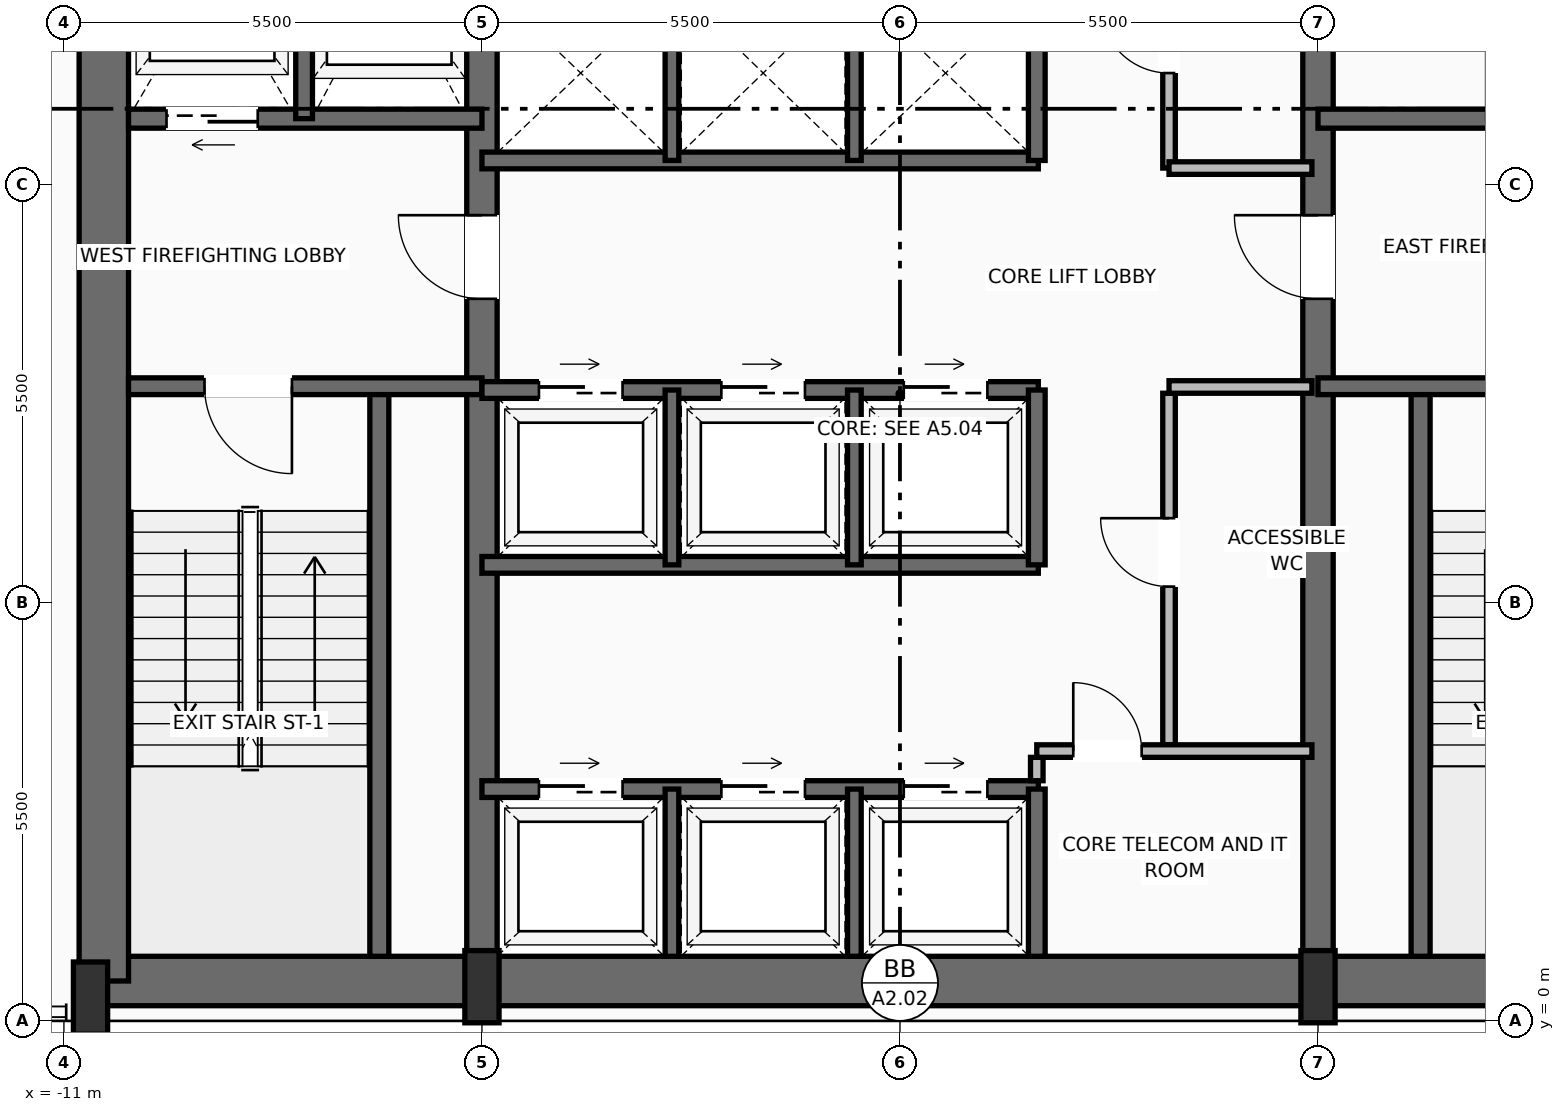
"""IFC4 building model, lengths in metres.
Left out: names, types, materials, properties, quantities, classifications, styles, units other than length and angle.
Written with IfcOpenShell. Run it as: python <this file> out.ifc"""

import sys

from ifc_helpers import new_model, si_unit, direction, frame, frame_2d, origin, origin_2d, place, context, subcontext, project, spatial, rectangle, extrude, source, transform, mapped, element, fill, save


model = new_model("IFC4")
c1 = context("Model", 3, precision=1e-05, world=origin(), true_north=direction((0.0, 1.0)))
c2 = subcontext(c1, "Body", "Model", "MODEL_VIEW")
j1 = project(units=[si_unit("LENGTHUNIT", "METRE"), si_unit("PLANEANGLEUNIT", "RADIAN")], contexts=[c1])
p1 = place(None, origin())
s1 = spatial("IfcSite", under=j1, at=p1, CompositionType="ELEMENT")
p2 = place(p1, origin())
s2 = spatial("IfcBuilding", under=s1, at=p2, CompositionType="ELEMENT")
p3 = place(p2, frame((0.0, 0.0, 121.0)))
s3 = spatial("IfcBuildingStorey", under=s2, at=p3, CompositionType="ELEMENT", Elevation=121.0)
p4 = place(p3, frame((-10.65, 0.525, 0.0), z_axis=(0.0, 0.0, 1.0), x_axis=(1.0, 0.0, 0.0)))
e1 = element("IfcWall", 1, at=p4, inside=s3, PredefinedType="SHEAR", context=c2, shape_type="SweptSolid", body=[
    extrude(rectangle(XDim=21.3, YDim=0.65, at=frame_2d((10.65, 0.0))), origin(), (0.0, 0.0, 1.0), 4.37),
])
p5 = place(p3, frame((-10.475, 0.525, 0.0), z_axis=(0.0, 0.0, 1.0), x_axis=(0.0, 1.0, 0.0)))
e2 = element("IfcWall", 2, at=p5, inside=s3, PredefinedType="SHEAR", context=c2, shape_type="SweptSolid", body=[
    extrude(rectangle(XDim=15.55, YDim=0.65, at=frame_2d((7.775, 0.0))), origin(), (0.0, 0.0, 1.0), 4.37),
])
p6 = place(p3, frame((-5.5, 0.525, 0.0), z_axis=(0.0, 0.0, 1.0), x_axis=(0.0, 1.0, 0.0)))
e3 = element("IfcWall", 3, at=p6, inside=s3, PredefinedType="SHEAR", context=c2, shape_type="SweptSolid", body=[
    extrude(rectangle(XDim=15.55, YDim=0.4, at=frame_2d((7.775, 0.0))), origin(), (0.0, 0.0, 1.0), 4.37),
])
p7 = place(p6, frame((8.975, 0.0, 0.0)))
e4 = element("IfcOpeningElement", 4, at=p7, cuts=e3, PredefinedType="OPENING", context=c2, shape_type="SweptSolid", body=[
    extrude(rectangle(XDim=1.1, YDim=2.2, at=frame_2d((0.55, 1.1))), frame((0.0, 0.21, 0.0), z_axis=(0.0, -1.0, 0.0), x_axis=(1.0, 0.0, 0.0)), (0.0, 0.0, 1.0), 0.42),
])
p8 = place(p3, frame((5.5, 0.525, 0.0), z_axis=(0.0, 0.0, 1.0), x_axis=(0.0, 1.0, 0.0)))
e5 = element("IfcWall", 5, at=p8, inside=s3, PredefinedType="SHEAR", context=c2, shape_type="SweptSolid", body=[
    extrude(rectangle(XDim=15.55, YDim=0.4, at=frame_2d((7.775, 0.0))), origin(), (0.0, 0.0, 1.0), 4.37),
])
p9 = place(p8, frame((8.975, 0.0, 0.0)))
e6 = element("IfcOpeningElement", 6, at=p9, cuts=e5, PredefinedType="OPENING", context=c2, shape_type="SweptSolid", body=[
    extrude(rectangle(XDim=1.1, YDim=2.2, at=frame_2d((0.55, 1.1))), frame((0.0, 0.21, 0.0), z_axis=(0.0, -1.0, 0.0), x_axis=(1.0, 0.0, 0.0)), (0.0, 0.0, 1.0), 0.42),
])
m1 = source(origin(), c2, "Body", "SweptSolid", [
    extrude(rectangle(XDim=0.45, YDim=0.95, at=origin_2d()), origin(), (0.0, 0.0, 1.0), 4.6),
])
for number, where, z_axis, x_axis in (
    (7, (-10.65, 0.3, 0.0), (0.0, 0.0, 1.0), (1.0, 0.0, 0.0)),
    (8, (-5.5, 0.45, 0.0), (0.0, 0.0, 1.0), (1.0, 0.0, 0.0)),
    (9, (5.5, 0.45, 0.0), (0.0, 0.0, 1.0), (1.0, 0.0, 0.0)),
):
    element("IfcColumn", number, at=place(p3, frame(where, z_axis=z_axis, x_axis=x_axis)), inside=s3, PredefinedType="PILASTER", context=c2, shape_type="MappedRepresentation", body=[
        mapped(m1, transform((0.0, 0.0, 0.0), scale=1.0)),
    ])
p10 = place(p3, frame((-6.85, 0.85, 0.0), z_axis=(0.0, 0.0, 1.0), x_axis=(0.0, 1.0, 0.0)))
e10 = element("IfcWall", 10, at=p10, inside=s3, PredefinedType="SOLIDWALL", context=c2, shape_type="SweptSolid", body=[
    extrude(rectangle(XDim=7.5, YDim=0.25, at=frame_2d((3.75, 0.0))), origin(), (0.0, 0.0, 1.0), 4.37),
])
p11 = place(p3, frame((-5.5, 8.35, 0.0), z_axis=(0.0, 0.0, 1.0), x_axis=(-1.0, 0.0, 0.0)))
e11 = element("IfcWall", 11, at=p11, inside=s3, PredefinedType="SOLIDWALL", context=c2, shape_type="SweptSolid", body=[
    extrude(rectangle(XDim=4.65, YDim=0.22, at=frame_2d((2.325, 0.0))), origin(), (0.0, 0.0, 1.0), 4.37),
])
p12 = place(p11, frame((2.5, 0.0, 0.0)))
e12 = element("IfcOpeningElement", 12, at=p12, cuts=e11, PredefinedType="OPENING", context=c2, shape_type="SweptSolid", body=[
    extrude(rectangle(XDim=1.15, YDim=2.2, at=frame_2d((0.575, 1.1))), frame((0.0, 0.12, 0.0), z_axis=(0.0, -1.0, 0.0), x_axis=(1.0, 0.0, 0.0)), (0.0, 0.0, 1.0), 0.24),
])
p13 = place(p3, frame((-5.5, 11.87, 0.0), z_axis=(0.0, 0.0, 1.0), x_axis=(-1.0, 0.0, 0.0)))
e13 = element("IfcWall", 13, at=p13, inside=s3, PredefinedType="SOLIDWALL", context=c2, shape_type="SweptSolid", body=[
    extrude(rectangle(XDim=4.65, YDim=0.25, at=frame_2d((2.325, 0.0))), origin(), (0.0, 0.0, 1.0), 4.37),
])
p14 = place(p13, frame((2.95, 0.0, 0.0)))
e14 = element("IfcOpeningElement", 14, at=p14, cuts=e13, PredefinedType="OPENING", context=c2, shape_type="SweptSolid", body=[
    extrude(rectangle(XDim=1.2, YDim=2.25, at=frame_2d((0.6, 1.125))), frame((0.0, 0.135, 0.0), z_axis=(0.0, -1.0, 0.0), x_axis=(1.0, 0.0, 0.0)), (0.0, 0.0, 1.0), 0.27),
])
p15 = place(p3, frame((-7.84, 11.87, 0.0), z_axis=(0.0, 0.0, 1.0), x_axis=(0.0, 1.0, 0.0)))
e15 = element("IfcWall", 15, at=p15, inside=s3, PredefinedType="SOLIDWALL", context=c2, shape_type="SweptSolid", body=[
    extrude(rectangle(XDim=3.88, YDim=0.22, at=frame_2d((1.94, 0.0))), origin(), (0.0, 0.0, 1.0), 4.37),
])
p16 = place(p3, frame((6.85, 0.85, 0.0), z_axis=(0.0, 0.0, 1.0), x_axis=(0.0, 1.0, 0.0)))
e16 = element("IfcWall", 16, at=p16, inside=s3, PredefinedType="SOLIDWALL", context=c2, shape_type="SweptSolid", body=[
    extrude(rectangle(XDim=7.5, YDim=0.25, at=frame_2d((3.75, 0.0))), origin(), (0.0, 0.0, 1.0), 4.37),
])
p17 = place(p3, frame((10.15, 8.35, 0.0), z_axis=(0.0, 0.0, 1.0), x_axis=(-1.0, 0.0, 0.0)))
e17 = element("IfcWall", 17, at=p17, inside=s3, PredefinedType="SOLIDWALL", context=c2, shape_type="SweptSolid", body=[
    extrude(rectangle(XDim=4.65, YDim=0.22, at=frame_2d((2.325, 0.0))), origin(), (0.0, 0.0, 1.0), 4.37),
])
p18 = place(p17, frame((1.0, 0.0, 0.0)))
e18 = element("IfcOpeningElement", 18, at=p18, cuts=e17, PredefinedType="OPENING", context=c2, shape_type="SweptSolid", body=[
    extrude(rectangle(XDim=1.15, YDim=2.2, at=frame_2d((0.575, 1.1))), frame((0.0, 0.12, 0.0), z_axis=(0.0, -1.0, 0.0), x_axis=(1.0, 0.0, 0.0)), (0.0, 0.0, 1.0), 0.24),
])
p19 = place(p3, frame((10.15, 11.87, 0.0), z_axis=(0.0, 0.0, 1.0), x_axis=(-1.0, 0.0, 0.0)))
e19 = element("IfcWall", 19, at=p19, inside=s3, PredefinedType="SOLIDWALL", context=c2, shape_type="SweptSolid", body=[
    extrude(rectangle(XDim=4.65, YDim=0.25, at=frame_2d((2.325, 0.0))), origin(), (0.0, 0.0, 1.0), 4.37),
])
p20 = place(p19, frame((0.5, 0.0, 0.0)))
e20 = element("IfcOpeningElement", 20, at=p20, cuts=e19, PredefinedType="OPENING", context=c2, shape_type="SweptSolid", body=[
    extrude(rectangle(XDim=1.2, YDim=2.25, at=frame_2d((0.6, 1.125))), frame((0.0, 0.135, 0.0), z_axis=(0.0, -1.0, 0.0), x_axis=(1.0, 0.0, 0.0)), (0.0, 0.0, 1.0), 0.27),
])
p21 = place(p3, frame((-5.5, 3.05, 0.0), z_axis=(0.0, 0.0, 1.0), x_axis=(1.0, 0.0, 0.0)))
e21 = element("IfcWall", 21, at=p21, inside=s3, PredefinedType="SOLIDWALL", context=c2, shape_type="SweptSolid", body=[
    extrude(rectangle(XDim=7.32, YDim=0.22, at=frame_2d((3.66, 0.0))), origin(), (0.0, 0.0, 1.0), 4.37),
])
p22 = place(p21, frame((0.75, 0.0, 0.0)))
e22 = element("IfcOpeningElement", 22, at=p22, cuts=e21, PredefinedType="OPENING", context=c2, shape_type="SweptSolid", body=[
    extrude(rectangle(XDim=1.1, YDim=2.2, at=frame_2d((0.55, 1.1))), frame((0.0, 0.12, 0.0), z_axis=(0.0, -1.0, 0.0), x_axis=(1.0, 0.0, 0.0)), (0.0, 0.0, 1.0), 0.24),
])
p23 = place(p21, frame((3.15, 0.0, 0.0)))
e23 = element("IfcOpeningElement", 23, at=p23, cuts=e21, PredefinedType="OPENING", context=c2, shape_type="SweptSolid", body=[
    extrude(rectangle(XDim=1.1, YDim=2.2, at=frame_2d((0.55, 1.1))), frame((0.0, 0.12, 0.0), z_axis=(0.0, -1.0, 0.0), x_axis=(1.0, 0.0, 0.0)), (0.0, 0.0, 1.0), 0.24),
])
p24 = place(p21, frame((5.55, 0.0, 0.0)))
e24 = element("IfcOpeningElement", 24, at=p24, cuts=e21, PredefinedType="OPENING", context=c2, shape_type="SweptSolid", body=[
    extrude(rectangle(XDim=1.1, YDim=2.2, at=frame_2d((0.55, 1.1))), frame((0.0, 0.12, 0.0), z_axis=(0.0, -1.0, 0.0), x_axis=(1.0, 0.0, 0.0)), (0.0, 0.0, 1.0), 0.24),
])
p25 = place(p3, frame((1.8, 0.85, 0.0), z_axis=(0.0, 0.0, 1.0), x_axis=(0.0, 1.0, 0.0)))
e25 = element("IfcWall", 25, at=p25, inside=s3, PredefinedType="SOLIDWALL", context=c2, shape_type="SweptSolid", body=[
    extrude(rectangle(XDim=2.2, YDim=0.22, at=frame_2d((1.1, 0.0))), origin(), (0.0, 0.0, 1.0), 4.37),
])
for number, where, z_axis, x_axis in (
    (26, (-3.0, 0.85, 0.0), (0.0, 0.0, 1.0), (0.0, 1.0, 0.0)),
    (27, (-0.6, 0.85, 0.0), (0.0, 0.0, 1.0), (0.0, 1.0, 0.0)),
):
    element("IfcWall", number, at=place(p3, frame(where, z_axis=z_axis, x_axis=x_axis)), inside=s3, PredefinedType="SOLIDWALL", context=c2, shape_type="SweptSolid", body=[
        extrude(rectangle(XDim=2.2, YDim=0.18, at=frame_2d((1.1, 0.0))), origin(), (0.0, 0.0, 1.0), 4.37),
    ])
p26 = place(p3, frame((1.8, 3.16, 0.0), z_axis=(0.0, 0.0, 1.0), x_axis=(0.0, 1.0, 0.0)))
e28 = element("IfcWall", 28, at=p26, inside=s3, PredefinedType="PARTITIONING", context=c2, shape_type="SweptSolid", body=[
    extrude(rectangle(XDim=0.308, YDim=0.165, at=frame_2d((0.154, 0.0))), origin(), (0.0, 0.0, 1.0), 4.362),
])
p27 = place(p3, frame((3.54, 3.633, 0.0), z_axis=(0.0, 0.0, 1.0), x_axis=(0.0, 1.0, 0.0)))
e29 = element("IfcWall", 29, at=p27, inside=s3, PredefinedType="PARTITIONING", context=c2, shape_type="SweptSolid", body=[
    extrude(rectangle(XDim=4.625, YDim=0.165, at=frame_2d((2.312, 0.0))), origin(), (0.0, 0.0, 1.0), 4.362),
])
p28 = place(p27, frame((2.081, 0.0, 0.0)))
e30 = element("IfcOpeningElement", 30, at=p28, cuts=e29, PredefinedType="OPENING", context=c2, shape_type="SweptSolid", body=[
    extrude(rectangle(XDim=0.9, YDim=2.1, at=frame_2d((0.45, 1.05))), frame((0.0, 0.093, 0.0), z_axis=(0.0, -1.0, 0.0), x_axis=(1.0, 0.0, 0.0)), (0.0, 0.0, 1.0), 0.185),
])
p29 = place(p3, frame((3.54, 8.34, 0.0), z_axis=(0.0, 0.0, 1.0), x_axis=(1.0, 0.0, 0.0)))
e31 = element("IfcWall", 31, at=p29, inside=s3, PredefinedType="PARTITIONING", context=c2, shape_type="SweptSolid", body=[
    extrude(rectangle(XDim=1.88, YDim=0.165, at=frame_2d((0.94, 0.0))), origin(), (0.0, 0.0, 1.0), 4.362),
])
p30 = place(p3, frame((1.8, 3.55, 0.0), z_axis=(0.0, 0.0, 1.0), x_axis=(1.0, 0.0, 0.0)))
e32 = element("IfcWall", 32, at=p30, inside=s3, PredefinedType="PARTITIONING", context=c2, shape_type="SweptSolid", body=[
    extrude(rectangle(XDim=3.62, YDim=0.165, at=frame_2d((1.81, 0.0))), origin(), (0.0, 0.0, 1.0), 4.362),
])
p31 = place(p30, frame((0.48, 0.0, 0.0)))
e33 = element("IfcOpeningElement", 33, at=p31, cuts=e32, PredefinedType="OPENING", context=c2, shape_type="SweptSolid", body=[
    extrude(rectangle(XDim=0.9, YDim=2.1, at=frame_2d((0.45, 1.05))), frame((0.0, 0.093, 0.0), z_axis=(0.0, -1.0, 0.0), x_axis=(1.0, 0.0, 0.0)), (0.0, 0.0, 1.0), 0.185),
])
p32 = place(p3, frame((-5.5, 6.0, 0.0), z_axis=(0.0, 0.0, 1.0), x_axis=(1.0, 0.0, 0.0)))
e34 = element("IfcWall", 34, at=p32, inside=s3, PredefinedType="SOLIDWALL", context=c2, shape_type="SweptSolid", body=[
    extrude(rectangle(XDim=7.32, YDim=0.22, at=frame_2d((3.66, 0.0))), origin(), (0.0, 0.0, 1.0), 4.37),
])
p33 = place(p3, frame((-5.5, 8.3, 0.0), z_axis=(0.0, 0.0, 1.0), x_axis=(1.0, 0.0, 0.0)))
e35 = element("IfcWall", 35, at=p33, inside=s3, PredefinedType="SOLIDWALL", context=c2, shape_type="SweptSolid", body=[
    extrude(rectangle(XDim=7.32, YDim=0.22, at=frame_2d((3.66, 0.0))), origin(), (0.0, 0.0, 1.0), 4.37),
])
p34 = place(p33, frame((0.75, 0.0, 0.0)))
e36 = element("IfcOpeningElement", 36, at=p34, cuts=e35, PredefinedType="OPENING", context=c2, shape_type="SweptSolid", body=[
    extrude(rectangle(XDim=1.1, YDim=2.2, at=frame_2d((0.55, 1.1))), frame((0.0, 0.12, 0.0), z_axis=(0.0, -1.0, 0.0), x_axis=(1.0, 0.0, 0.0)), (0.0, 0.0, 1.0), 0.24),
])
p35 = place(p33, frame((3.15, 0.0, 0.0)))
e37 = element("IfcOpeningElement", 37, at=p35, cuts=e35, PredefinedType="OPENING", context=c2, shape_type="SweptSolid", body=[
    extrude(rectangle(XDim=1.1, YDim=2.2, at=frame_2d((0.55, 1.1))), frame((0.0, 0.12, 0.0), z_axis=(0.0, -1.0, 0.0), x_axis=(1.0, 0.0, 0.0)), (0.0, 0.0, 1.0), 0.24),
])
p36 = place(p33, frame((5.55, 0.0, 0.0)))
e38 = element("IfcOpeningElement", 38, at=p36, cuts=e35, PredefinedType="OPENING", context=c2, shape_type="SweptSolid", body=[
    extrude(rectangle(XDim=1.1, YDim=2.2, at=frame_2d((0.55, 1.1))), frame((0.0, 0.12, 0.0), z_axis=(0.0, -1.0, 0.0), x_axis=(1.0, 0.0, 0.0)), (0.0, 0.0, 1.0), 0.24),
])
p37 = place(p3, frame((1.8, 6.0, 0.0), z_axis=(0.0, 0.0, 1.0), x_axis=(0.0, 1.0, 0.0)))
e39 = element("IfcWall", 39, at=p37, inside=s3, PredefinedType="SOLIDWALL", context=c2, shape_type="SweptSolid", body=[
    extrude(rectangle(XDim=2.3, YDim=0.22, at=frame_2d((1.15, 0.0))), origin(), (0.0, 0.0, 1.0), 4.37),
])
for number, where, z_axis, x_axis in (
    (40, (-3.0, 6.0, 0.0), (0.0, 0.0, 1.0), (0.0, 1.0, 0.0)),
    (41, (-0.6, 6.0, 0.0), (0.0, 0.0, 1.0), (0.0, 1.0, 0.0)),
):
    element("IfcWall", number, at=place(p3, frame(where, z_axis=z_axis, x_axis=x_axis)), inside=s3, PredefinedType="SOLIDWALL", context=c2, shape_type="SweptSolid", body=[
        extrude(rectangle(XDim=2.3, YDim=0.18, at=frame_2d((1.15, 0.0))), origin(), (0.0, 0.0, 1.0), 4.37),
    ])
p38 = place(p3, frame((-5.5, 11.32, 0.0), z_axis=(0.0, 0.0, 1.0), x_axis=(1.0, 0.0, 0.0)))
e42 = element("IfcWall", 42, at=p38, inside=s3, PredefinedType="SOLIDWALL", context=c2, shape_type="SweptSolid", body=[
    extrude(rectangle(XDim=7.32, YDim=0.22, at=frame_2d((3.66, 0.0))), origin(), (0.0, 0.0, 1.0), 4.37),
])
p39 = place(p3, frame((1.8, 11.32, 0.0), z_axis=(0.0, 0.0, 1.0), x_axis=(0.0, 1.0, 0.0)))
e43 = element("IfcWall", 43, at=p39, inside=s3, PredefinedType="SOLIDWALL", context=c2, shape_type="SweptSolid", body=[
    extrude(rectangle(XDim=2.3, YDim=0.22, at=frame_2d((1.15, 0.0))), origin(), (0.0, 0.0, 1.0), 4.37),
])
for number, where, z_axis, x_axis in (
    (44, (-3.0, 11.32, 0.0), (0.0, 0.0, 1.0), (0.0, 1.0, 0.0)),
    (45, (-0.6, 11.32, 0.0), (0.0, 0.0, 1.0), (0.0, 1.0, 0.0)),
):
    element("IfcWall", number, at=place(p3, frame(where, z_axis=z_axis, x_axis=x_axis)), inside=s3, PredefinedType="SOLIDWALL", context=c2, shape_type="SweptSolid", body=[
        extrude(rectangle(XDim=2.3, YDim=0.18, at=frame_2d((1.15, 0.0))), origin(), (0.0, 0.0, 1.0), 4.37),
    ])
p40 = place(p3, frame((3.54, 11.22, 0.0), z_axis=(0.0, 0.0, 1.0), x_axis=(0.0, 1.0, 0.0)))
e46 = element("IfcWall", 46, at=p40, inside=s3, PredefinedType="PARTITIONING", context=c2, shape_type="SweptSolid", body=[
    extrude(rectangle(XDim=4.53, YDim=0.165, at=frame_2d((2.265, 0.0))), origin(), (0.0, 0.0, 1.0), 4.362),
])
p41 = place(p40, frame((1.25, 0.0, 0.0)))
e47 = element("IfcOpeningElement", 47, at=p41, cuts=e46, PredefinedType="OPENING", context=c2, shape_type="SweptSolid", body=[
    extrude(rectangle(XDim=0.9, YDim=2.1, at=frame_2d((0.45, 1.05))), frame((0.0, 0.093, 0.0), z_axis=(0.0, -1.0, 0.0), x_axis=(1.0, 0.0, 0.0)), (0.0, 0.0, 1.0), 0.185),
])
p42 = place(p3, frame((3.54, 11.22, 0.0), z_axis=(0.0, 0.0, 1.0), x_axis=(1.0, 0.0, 0.0)))
e48 = element("IfcWall", 48, at=p42, inside=s3, PredefinedType="PARTITIONING", context=c2, shape_type="SweptSolid", body=[
    extrude(rectangle(XDim=1.88, YDim=0.165, at=frame_2d((0.94, 0.0))), origin(), (0.0, 0.0, 1.0), 4.362),
])
m2 = source(origin(), c2, "Body", "SweptSolid", [
    extrude(rectangle(XDim=1.15, YDim=2.2, at=frame_2d((0.575, 1.1))), frame((0.0, 0.025, 0.0), z_axis=(0.0, -1.0, 0.0), x_axis=(1.0, 0.0, 0.0)), (0.0, 0.0, 1.0), 0.05),
])
p43 = place(p12, origin())
e49 = element("IfcDoor", 49, at=p43, inside=s3, OperationType="SINGLE_SWING_LEFT", PredefinedType="DOOR", context=c2, shape_type="MappedRepresentation", body=[
    mapped(m2, transform((0.0, 0.0, 0.0), scale=1.0)),
])
fill(e12, e49)
m3 = source(origin(), c2, "Body", "SweptSolid", [
    extrude(rectangle(XDim=1.1, YDim=2.2, at=frame_2d((0.55, 1.1))), frame((0.0, 0.025, 0.0), z_axis=(0.0, -1.0, 0.0), x_axis=(1.0, 0.0, 0.0)), (0.0, 0.0, 1.0), 0.05),
])
p44 = place(p7, origin())
e50 = element("IfcDoor", 50, at=p44, inside=s3, OperationType="SINGLE_SWING_RIGHT", PredefinedType="DOOR", context=c2, shape_type="MappedRepresentation", body=[
    mapped(m3, transform((0.0, 0.0, 0.0), scale=1.0)),
])
fill(e4, e50)
m4 = source(origin(), c2, "Body", "SweptSolid", [
    extrude(rectangle(XDim=1.2, YDim=2.25, at=frame_2d((0.6, 1.125))), frame((0.0, 0.025, 0.0), z_axis=(0.0, -1.0, 0.0), x_axis=(1.0, 0.0, 0.0)), (0.0, 0.0, 1.0), 0.05),
])
p45 = place(p14, origin())
e51 = element("IfcDoor", 51, at=p45, inside=s3, OperationType="SLIDING_TO_LEFT", PredefinedType="DOOR", context=c2, shape_type="MappedRepresentation", body=[
    mapped(m4, transform((0.0, 0.0, 0.0), scale=1.0)),
])
fill(e14, e51)
p46 = place(p9, origin())
e52 = element("IfcDoor", 52, at=p46, inside=s3, OperationType="SINGLE_SWING_RIGHT", PredefinedType="DOOR", context=c2, shape_type="MappedRepresentation", body=[
    mapped(m3, transform((0.0, 0.0, 0.0), scale=1.0)),
])
fill(e6, e52)
m5 = source(origin(), c2, "Body", "SweptSolid", [
    extrude(rectangle(XDim=1.1, YDim=2.2, at=frame_2d((0.55, 1.1))), frame((0.0, 0.025, 0.0), z_axis=(0.0, -1.0, 0.0), x_axis=(1.0, 0.0, 0.0)), (0.0, 0.0, 1.0), 0.05),
])
p47 = place(p22, origin())
e53 = element("IfcDoor", 53, at=p47, inside=s3, OperationType="SLIDING_TO_RIGHT", PredefinedType="DOOR", context=c2, shape_type="MappedRepresentation", body=[
    mapped(m5, transform((0.0, 0.0, 0.0), scale=1.0)),
])
fill(e22, e53)
p48 = place(p23, origin())
e54 = element("IfcDoor", 54, at=p48, inside=s3, OperationType="SLIDING_TO_RIGHT", PredefinedType="DOOR", context=c2, shape_type="MappedRepresentation", body=[
    mapped(m5, transform((0.0, 0.0, 0.0), scale=1.0)),
])
fill(e23, e54)
p49 = place(p24, origin())
e55 = element("IfcDoor", 55, at=p49, inside=s3, OperationType="SLIDING_TO_RIGHT", PredefinedType="DOOR", context=c2, shape_type="MappedRepresentation", body=[
    mapped(m5, transform((0.0, 0.0, 0.0), scale=1.0)),
])
fill(e24, e55)
m6 = source(origin(), c2, "Body", "SweptSolid", [
    extrude(rectangle(XDim=0.9, YDim=2.1, at=frame_2d((0.45, 1.05))), frame((0.0, 0.025, 0.0), z_axis=(0.0, -1.0, 0.0), x_axis=(1.0, 0.0, 0.0)), (0.0, 0.0, 1.0), 0.05),
])
p50 = place(p31, origin())
e56 = element("IfcDoor", 56, at=p50, inside=s3, OperationType="SINGLE_SWING_LEFT", PredefinedType="DOOR", context=c2, shape_type="MappedRepresentation", body=[
    mapped(m6, transform((0.0, 0.0, 0.0), scale=1.0)),
])
fill(e33, e56)
p51 = place(p28, origin())
e57 = element("IfcDoor", 57, at=p51, inside=s3, OperationType="SINGLE_SWING_RIGHT", PredefinedType="DOOR", context=c2, shape_type="MappedRepresentation", body=[
    mapped(m6, transform((0.0, 0.0, 0.0), scale=1.0)),
])
fill(e30, e57)
p52 = place(p34, origin())
e58 = element("IfcDoor", 58, at=p52, inside=s3, OperationType="SLIDING_TO_LEFT", PredefinedType="DOOR", context=c2, shape_type="MappedRepresentation", body=[
    mapped(m5, transform((0.0, 0.0, 0.0), scale=1.0)),
])
fill(e36, e58)
p53 = place(p35, origin())
e59 = element("IfcDoor", 59, at=p53, inside=s3, OperationType="SLIDING_TO_LEFT", PredefinedType="DOOR", context=c2, shape_type="MappedRepresentation", body=[
    mapped(m5, transform((0.0, 0.0, 0.0), scale=1.0)),
])
fill(e37, e59)
p54 = place(p36, origin())
e60 = element("IfcDoor", 60, at=p54, inside=s3, OperationType="SLIDING_TO_LEFT", PredefinedType="DOOR", context=c2, shape_type="MappedRepresentation", body=[
    mapped(m5, transform((0.0, 0.0, 0.0), scale=1.0)),
])
fill(e38, e60)
p55 = place(p41, origin())
e61 = element("IfcDoor", 61, at=p55, inside=s3, OperationType="SINGLE_SWING_RIGHT", PredefinedType="DOOR", context=c2, shape_type="MappedRepresentation", body=[
    mapped(m6, transform((0.0, 0.0, 0.0), scale=1.0)),
])
fill(e47, e61)
save(model, sys.argv[1])
